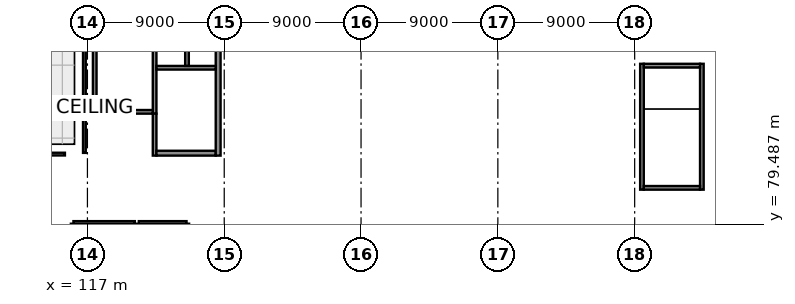
"""IFC4 building model, lengths in metres.
Left out: names, types, materials, properties, quantities, classifications, styles, units other than length and angle.
Written with IfcOpenShell. Run it as: python <this file> out.ifc"""

import sys

from ifc_helpers import new_model, si_unit, direction, frame, frame_2d, origin, place, context, subcontext, project, spatial, rectangle, extrude, element, fill, save


model = new_model("IFC4")
c1 = context("Model", 3, precision=1e-05, world=origin(), true_north=direction((0.0, 1.0)))
c2 = subcontext(c1, "Body", "Model", "MODEL_VIEW")
j1 = project(units=[si_unit("LENGTHUNIT", "METRE"), si_unit("PLANEANGLEUNIT", "RADIAN")], contexts=[c1])
p1 = place(None, origin())
s1 = spatial("IfcSite", under=j1, at=p1, CompositionType="ELEMENT")
p2 = place(p1, origin())
s2 = spatial("IfcBuilding", under=s1, at=p2, CompositionType="ELEMENT")
p3 = place(p2, frame((0.0, 0.0, -4.5)))
s3 = spatial("IfcBuildingStorey", under=s2, at=p3, CompositionType="ELEMENT", Elevation=-4.5)
p4 = place(p3, frame((117.48, 86.76, 0.0), z_axis=(0.0, 0.0, 1.0), x_axis=(0.0, 1.0, 0.0)))
e1 = element("IfcWall", 1, at=p4, inside=s3, PredefinedType="SHEAR", context=c2, shape_type="SweptSolid", body=[
    extrude(rectangle(XDim=8.28, YDim=0.24, at=frame_2d((4.14, 0.0))), origin(), (0.0, 0.0, 1.0), 4.31),
])
p5 = place(p3, frame((121.42, 86.76, 0.0), z_axis=(0.0, 0.0, 1.0), x_axis=(0.0, 1.0, 0.0)))
e2 = element("IfcWall", 2, at=p5, inside=s3, PredefinedType="SHEAR", context=c2, shape_type="SweptSolid", body=[
    extrude(rectangle(XDim=8.28, YDim=0.24, at=frame_2d((4.14, 0.0))), origin(), (0.0, 0.0, 1.0), 4.31),
])
p6 = place(p5, frame((0.54, 0.0, 0.0)))
e3 = element("IfcOpeningElement", 3, at=p6, cuts=e2, PredefinedType="OPENING", context=c2, shape_type="SweptSolid", body=[
    extrude(rectangle(XDim=1.2, YDim=2.15, at=frame_2d((0.6, 1.075))), frame((0.0, 0.135, 0.0), z_axis=(0.0, -1.0, 0.0), x_axis=(1.0, 0.0, 0.0)), (0.0, 0.0, 1.0), 0.27),
])
p7 = place(p3, frame((117.6, 86.88, 0.0), z_axis=(0.0, 0.0, 1.0), x_axis=(1.0, 0.0, 0.0)))
e4 = element("IfcWall", 4, at=p7, inside=s3, PredefinedType="SHEAR", context=c2, shape_type="SweptSolid", body=[
    extrude(rectangle(XDim=3.7, YDim=0.24, at=frame_2d((1.85, 0.0))), origin(), (0.0, 0.0, 1.0), 4.31),
])
p8 = place(p3, frame((153.48, 81.76, 0.0), z_axis=(0.0, 0.0, 1.0), x_axis=(0.0, 1.0, 0.0)))
e5 = element("IfcWall", 5, at=p8, inside=s3, PredefinedType="SHEAR", context=c2, shape_type="SweptSolid", body=[
    extrude(rectangle(XDim=8.28, YDim=0.24, at=frame_2d((4.14, 0.0))), origin(), (0.0, 0.0, 1.0), 4.31),
])
p9 = place(p3, frame((157.42, 81.76, 0.0), z_axis=(0.0, 0.0, 1.0), x_axis=(0.0, 1.0, 0.0)))
e6 = element("IfcWall", 6, at=p9, inside=s3, PredefinedType="SHEAR", context=c2, shape_type="SweptSolid", body=[
    extrude(rectangle(XDim=8.28, YDim=0.24, at=frame_2d((4.14, 0.0))), origin(), (0.0, 0.0, 1.0), 4.31),
])
p10 = place(p9, frame((0.49, 0.0, 0.0)))
e7 = element("IfcOpeningElement", 7, at=p10, cuts=e6, PredefinedType="OPENING", context=c2, shape_type="SweptSolid", body=[
    extrude(rectangle(XDim=1.3, YDim=2.2, at=frame_2d((0.65, 1.1))), frame((0.0, 0.135, 0.0), z_axis=(0.0, -1.0, 0.0), x_axis=(1.0, 0.0, 0.0)), (0.0, 0.0, 1.0), 0.27),
])
for number, where, z_axis, x_axis in (
    (8, (153.6, 81.88, 0.0), (0.0, 0.0, 1.0), (1.0, 0.0, 0.0)),
    (9, (153.6, 89.92, 0.0), (0.0, 0.0, 1.0), (1.0, 0.0, 0.0)),
):
    element("IfcWall", number, at=place(p3, frame(where, z_axis=z_axis, x_axis=x_axis)), inside=s3, PredefinedType="SHEAR", context=c2, shape_type="SweptSolid", body=[
        extrude(rectangle(XDim=3.7, YDim=0.24, at=frame_2d((1.85, 0.0))), origin(), (0.0, 0.0, 1.0), 4.31),
    ])
p11 = place(p3, frame((121.42, 84.0, 0.0), z_axis=(0.0, 0.0, 1.0), x_axis=(0.0, 1.0, 0.0)))
e10 = element("IfcWall", 10, at=p11, inside=s3, PredefinedType="SHEAR", context=c2, shape_type="SweptSolid", body=[
    extrude(rectangle(XDim=2.76, YDim=0.24, at=frame_2d((1.38, 0.0))), origin(), (0.0, 0.0, 1.0), 4.16),
])
p12 = place(p3, frame((121.54, 84.16, 0.0), z_axis=(0.0, 0.0, 1.0), x_axis=(1.0, 0.0, 0.0)))
e11 = element("IfcWall", 11, at=p12, inside=s3, PredefinedType="SHEAR", context=c2, shape_type="SweptSolid", body=[
    extrude(rectangle(XDim=3.9, YDim=0.32, at=frame_2d((1.95, 0.0))), origin(), (0.0, 0.0, 1.0), 4.16),
])
p13 = place(p12, frame((1.225, 0.0, 0.0)))
e12 = element("IfcOpeningElement", 12, at=p13, cuts=e11, PredefinedType="OPENING", context=c2, shape_type="SweptSolid", body=[
    extrude(rectangle(XDim=1.45, YDim=2.2, at=frame_2d((0.725, 1.1))), frame((0.0, 0.175, 0.0), z_axis=(0.0, -1.0, 0.0), x_axis=(1.0, 0.0, 0.0)), (0.0, 0.0, 1.0), 0.35),
])
p14 = place(p3, frame((125.6, 84.0, 0.0), z_axis=(0.0, 0.0, 1.0), x_axis=(0.0, 1.0, 0.0)))
e13 = element("IfcWall", 13, at=p14, inside=s3, PredefinedType="SHEAR", context=c2, shape_type="SweptSolid", body=[
    extrude(rectangle(XDim=9.04, YDim=0.32, at=frame_2d((4.52, 0.0))), origin(), (0.0, 0.0, 1.0), 4.16),
])
p15 = place(p3, frame((121.54, 89.78, 0.0), z_axis=(0.0, 0.0, 1.0), x_axis=(1.0, 0.0, 0.0)))
e14 = element("IfcWall", 14, at=p15, inside=s3, PredefinedType="SHEAR", context=c2, shape_type="SweptSolid", body=[
    extrude(rectangle(XDim=3.9, YDim=0.24, at=frame_2d((1.95, 0.0))), origin(), (0.0, 0.0, 1.0), 4.31),
])
p16 = place(p15, frame((0.385, 0.0, 0.0)))
e15 = element("IfcOpeningElement", 15, at=p16, cuts=e14, PredefinedType="OPENING", context=c2, shape_type="SweptSolid", body=[
    extrude(rectangle(XDim=1.3, YDim=2.2, at=frame_2d((0.65, 1.1))), frame((0.0, 0.135, 0.0), z_axis=(0.0, -1.0, 0.0), x_axis=(1.0, 0.0, 0.0)), (0.0, 0.0, 1.0), 0.27),
])
p17 = place(p15, frame((2.335, 0.0, 0.0)))
e16 = element("IfcOpeningElement", 16, at=p17, cuts=e14, PredefinedType="OPENING", context=c2, shape_type="SweptSolid", body=[
    extrude(rectangle(XDim=1.3, YDim=2.2, at=frame_2d((0.65, 1.1))), frame((0.0, 0.135, 0.0), z_axis=(0.0, -1.0, 0.0), x_axis=(1.0, 0.0, 0.0)), (0.0, 0.0, 1.0), 0.27),
])
p18 = place(p3, frame((123.55, 89.9, 0.0), z_axis=(0.0, 0.0, 1.0), x_axis=(0.0, 1.0, 0.0)))
e17 = element("IfcWall", 17, at=p18, inside=s3, PredefinedType="SHEAR", context=c2, shape_type="SweptSolid", body=[
    extrude(rectangle(XDim=2.9, YDim=0.24, at=frame_2d((1.45, 0.0))), origin(), (0.0, 0.0, 1.0), 4.31),
])
p19 = place(p3, frame((115.52, 84.1, 0.0), z_axis=(0.0, 0.0, 1.0), x_axis=(-1.0, 0.0, 0.0)))
e18 = element("IfcWall", 18, at=p19, inside=s3, PredefinedType="PARTITIONING", context=c2, shape_type="SweptSolid", body=[
    extrude(rectangle(XDim=3.24, YDim=0.18, at=frame_2d((1.62, 0.0))), origin(), (0.0, 0.0, 1.0), 4.14),
])
p20 = place(p3, frame((116.8, 95.82, 0.0), z_axis=(0.0, 0.0, 1.0), x_axis=(0.0, -1.0, 0.0)))
e19 = element("IfcWall", 19, at=p20, inside=s3, PredefinedType="PARTITIONING", context=c2, shape_type="SweptSolid", body=[
    extrude(rectangle(XDim=11.64, YDim=0.18, at=frame_2d((5.82, 0.0))), origin(), (0.0, 0.0, 1.0), 3.405),
])
p21 = place(p3, frame((116.0, 75.23, 0.0), z_axis=(0.0, 0.0, 1.0), x_axis=(0.0, 1.0, 0.0)))
e20 = element("IfcWall", 20, at=p21, inside=s3, PredefinedType="PARTITIONING", context=c2, shape_type="SweptSolid", body=[
    extrude(rectangle(XDim=4.29, YDim=0.18, at=frame_2d((2.145, 0.0))), origin(), (0.0, 0.0, 1.0), 4.14),
])
p22 = place(p21, frame((1.227, 0.0, 0.0)))
e21 = element("IfcOpeningElement", 21, at=p22, cuts=e20, PredefinedType="OPENING", context=c2, shape_type="SweptSolid", body=[
    extrude(rectangle(XDim=1.15, YDim=2.15, at=frame_2d((0.575, 1.075))), frame((0.0, 0.105, 0.0), z_axis=(0.0, -1.0, 0.0), x_axis=(1.0, 0.0, 0.0)), (0.0, 0.0, 1.0), 0.21),
])
p23 = place(p3, frame((116.08, 79.6, 0.0), z_axis=(0.0, 0.0, 1.0), x_axis=(1.0, 0.0, 0.0)))
e22 = element("IfcWall", 22, at=p23, inside=s3, PredefinedType="PARTITIONING", context=c2, shape_type="SweptSolid", body=[
    extrude(rectangle(XDim=4.04, YDim=0.18, at=frame_2d((2.02, 0.0))), origin(), (0.0, 0.0, 1.0), 4.14),
])
p24 = place(p3, frame((120.2, 79.52, 0.0), z_axis=(0.0, 0.0, 1.0), x_axis=(0.0, -1.0, 0.0)))
e23 = element("IfcWall", 23, at=p24, inside=s3, PredefinedType="PARTITIONING", context=c2, shape_type="SweptSolid", body=[
    extrude(rectangle(XDim=4.29, YDim=0.18, at=frame_2d((2.145, 0.0))), origin(), (0.0, 0.0, 1.0), 4.14),
])
p25 = place(p3, frame((120.38, 79.6, 0.0), z_axis=(0.0, 0.0, 1.0), x_axis=(1.0, 0.0, 0.0)))
e24 = element("IfcWall", 24, at=p25, inside=s3, PredefinedType="PARTITIONING", context=c2, shape_type="SweptSolid", body=[
    extrude(rectangle(XDim=3.14, YDim=0.18, at=frame_2d((1.57, 0.0))), origin(), (0.0, 0.0, 1.0), 4.14),
])
p26 = place(p3, frame((123.6, 79.52, 0.0), z_axis=(0.0, 0.0, 1.0), x_axis=(0.0, -1.0, 0.0)))
e25 = element("IfcWall", 25, at=p26, inside=s3, PredefinedType="PARTITIONING", context=c2, shape_type="SweptSolid", body=[
    extrude(rectangle(XDim=4.29, YDim=0.18, at=frame_2d((2.145, 0.0))), origin(), (0.0, 0.0, 1.0), 4.14),
])
p27 = place(p6, frame((1.2, 0.0, 0.0), z_axis=(0.0, 0.0, 1.0), x_axis=(-1.0, 0.0, 0.0)))
e26 = element("IfcDoor", 26, at=p27, inside=s3, OperationType="SINGLE_SWING_LEFT", PredefinedType="DOOR", context=c2, shape_type="SweptSolid", body=[
    extrude(rectangle(XDim=1.2, YDim=2.15, at=frame_2d((0.6, 1.075))), frame((0.0, 0.025, 0.0), z_axis=(0.0, -1.0, 0.0), x_axis=(1.0, 0.0, 0.0)), (0.0, 0.0, 1.0), 0.05),
])
fill(e3, e26)
p28 = place(p10, frame((1.3, 0.0, 0.0), z_axis=(0.0, 0.0, 1.0), x_axis=(-1.0, 0.0, 0.0)))
e27 = element("IfcDoor", 27, at=p28, inside=s3, OperationType="SINGLE_SWING_RIGHT", PredefinedType="DOOR", context=c2, shape_type="SweptSolid", body=[
    extrude(rectangle(XDim=1.3, YDim=2.2, at=frame_2d((0.65, 1.1))), frame((0.0, 0.025, 0.0), z_axis=(0.0, -1.0, 0.0), x_axis=(1.0, 0.0, 0.0)), (0.0, 0.0, 1.0), 0.05),
])
fill(e7, e27)
p29 = place(p13, origin())
e28 = element("IfcDoor", 28, at=p29, inside=s3, OperationType="DOUBLE_DOOR_SINGLE_SWING", PredefinedType="DOOR", context=c2, shape_type="SweptSolid", body=[
    extrude(rectangle(XDim=1.45, YDim=2.2, at=frame_2d((0.725, 1.1))), frame((0.0, 0.025, 0.0), z_axis=(0.0, -1.0, 0.0), x_axis=(1.0, 0.0, 0.0)), (0.0, 0.0, 1.0), 0.05),
])
fill(e12, e28)
p30 = place(p16, origin())
e29 = element("IfcDoor", 29, at=p30, inside=s3, OperationType="DOUBLE_DOOR_SLIDING", PredefinedType="DOOR", context=c2, shape_type="SweptSolid", body=[
    extrude(rectangle(XDim=1.3, YDim=2.2, at=frame_2d((0.65, 1.1))), frame((0.0, 0.025, 0.0), z_axis=(0.0, -1.0, 0.0), x_axis=(1.0, 0.0, 0.0)), (0.0, 0.0, 1.0), 0.05),
])
fill(e15, e29)
p31 = place(p17, origin())
e30 = element("IfcDoor", 30, at=p31, inside=s3, OperationType="DOUBLE_DOOR_SLIDING", PredefinedType="DOOR", context=c2, shape_type="SweptSolid", body=[
    extrude(rectangle(XDim=1.3, YDim=2.2, at=frame_2d((0.65, 1.1))), frame((0.0, 0.025, 0.0), z_axis=(0.0, -1.0, 0.0), x_axis=(1.0, 0.0, 0.0)), (0.0, 0.0, 1.0), 0.05),
])
fill(e16, e30)
save(model, sys.argv[1])
